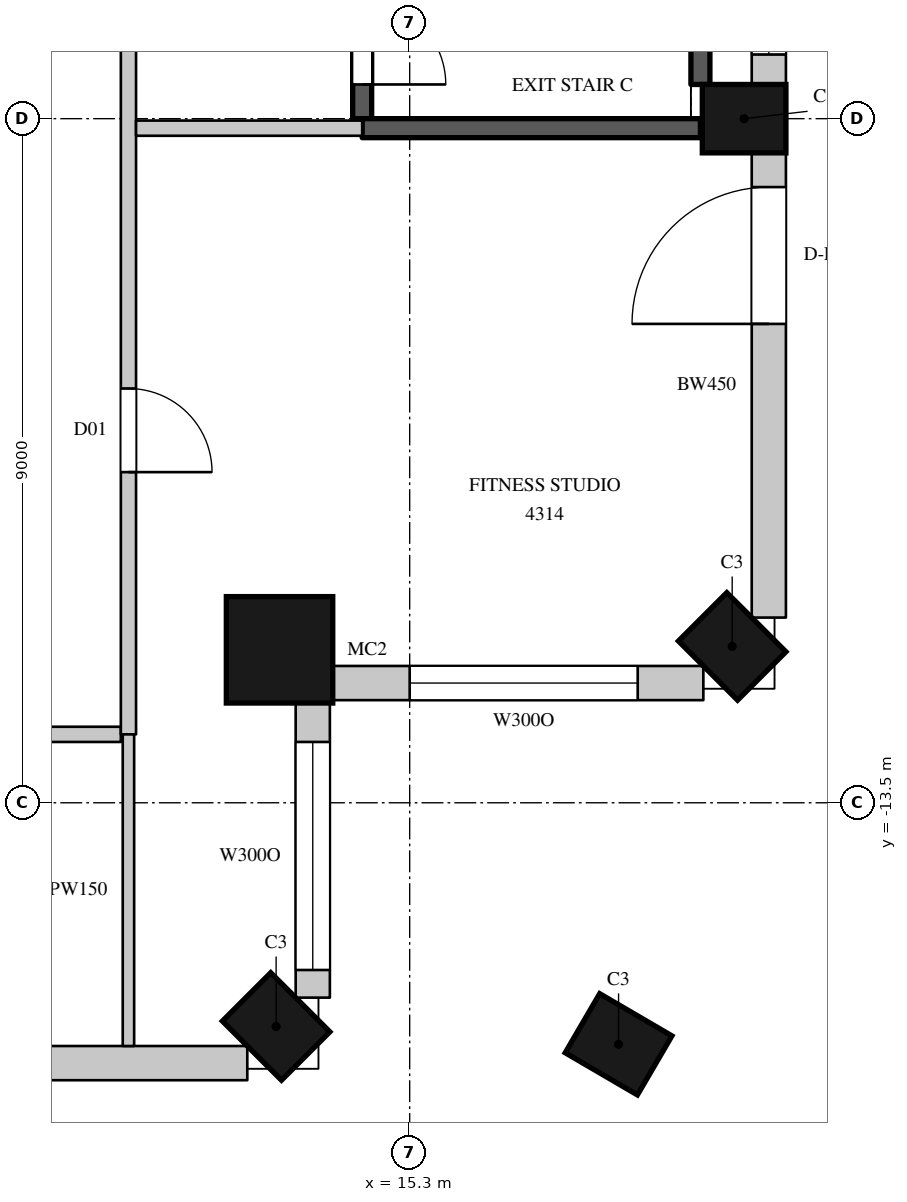
"""IFC4 building model, lengths in metres.
Left out: names, types, materials, properties, quantities, classifications, styles, units other than length and angle.
Written with IfcOpenShell. Run it as: python <this file> out.ifc"""

import sys

from ifc_helpers import new_model, si_unit, direction, frame, frame_2d, origin, origin_2d, place, context, subcontext, project, spatial, rectangle, circle, extrude, element, fill, save


model = new_model("IFC4")
c1 = context("Model", 3, precision=1e-05, world=origin(), true_north=direction((0.0, 1.0)))
c2 = subcontext(c1, "Body", "Model", "MODEL_VIEW")
j1 = project(units=[si_unit("LENGTHUNIT", "METRE"), si_unit("PLANEANGLEUNIT", "RADIAN")], contexts=[c1])
p1 = place(None, origin())
s1 = spatial("IfcSite", under=j1, at=p1, CompositionType="ELEMENT")
p2 = place(p1, origin())
s2 = spatial("IfcBuilding", under=s1, at=p2, CompositionType="ELEMENT")
p3 = place(p2, frame((0.0, 0.0, 197.4)))
s3 = spatial("IfcBuildingStorey", under=s2, at=p3, CompositionType="ELEMENT", Elevation=197.4)
p4 = place(p3, frame((13.543, -16.443, 0.0), z_axis=(0.0, 0.0, 1.0), x_axis=(0.707106781187, 0.707106781187, 0.0)))
e1 = element("IfcColumn", 1, at=p4, inside=s3, PredefinedType="COLUMN", context=c2, shape_type="SweptSolid", body=[
    extrude(rectangle(XDim=0.9, YDim=1.1, at=origin_2d()), origin(), (0.0, 0.0, 1.0), 4.1),
])
p5 = place(p3, frame((13.588, -11.488, 0.0), z_axis=(0.0, 0.0, 1.0), x_axis=(1.0, 0.0, 0.0)))
e2 = element("IfcColumn", 2, at=p5, inside=s3, PredefinedType="COLUMN", context=c2, shape_type="SweptSolid", body=[
    extrude(circle(Radius=0.7, at=origin_2d()), origin(), (0.0, 0.0, 1.0), 4.1),
])
for number, where, z_axis, x_axis in (
    (3, (19.543, -11.443, 0.0), (0.0, 0.0, 1.0), (0.707, 0.707, 0.0)),
    (4, (19.7, -4.5, 0.0), (0.0, 0.0, 1.0), (0.0, 1.0, 0.0)),
    (5, (18.048, -16.677, 0.0), (0.0, 0.0, 1.0), (0.504, 0.863, 0.0)),
):
    element("IfcColumn", number, at=place(p3, frame(where, z_axis=z_axis, x_axis=x_axis)), inside=s3, PredefinedType="COLUMN", context=c2, shape_type="SweptSolid", body=[
        extrude(rectangle(XDim=0.9, YDim=1.1, at=origin_2d()), origin(), (0.0, 0.0, 1.0), 4.1),
    ])
p6 = place(p3, frame((6.75, -16.925, 0.0), z_axis=(0.0, 0.0, 1.0), x_axis=(1.0, 0.0, 0.0)))
e6 = element("IfcWall", 6, at=p6, inside=s3, PredefinedType="SOLIDWALL", context=c2, shape_type="SweptSolid", body=[
    extrude(rectangle(XDim=6.414, YDim=0.45, at=frame_2d((3.207, 0.0))), origin(), (0.0, 0.0, 1.0), 3.8),
])
p7 = place(p6, frame((0.525, 0.0, 0.0)))
e7 = element("IfcOpeningElement", 7, at=p7, cuts=e6, PredefinedType="OPENING", context=c2, shape_type="SweptSolid", body=[
    extrude(rectangle(XDim=1.8, YDim=2.4, at=frame_2d((0.9, 1.2))), frame((0.0, 0.235, 0.0), z_axis=(0.0, -1.0, 0.0), x_axis=(1.0, 0.0, 0.0)), (0.0, 0.0, 1.0), 0.47),
])
p8 = place(p3, frame((14.025, -16.064, 0.0), z_axis=(0.0, 0.0, 1.0), x_axis=(0.0, 1.0, 0.0)))
e8 = element("IfcWall", 8, at=p8, inside=s3, PredefinedType="SOLIDWALL", context=c2, shape_type="SweptSolid", body=[
    extrude(rectangle(XDim=3.909, YDim=0.45, at=frame_2d((1.955, 0.0))), origin(), (0.0, 0.0, 1.0), 3.8),
])
p9 = place(p8, frame((0.364, 0.0, 1.05)))
e9 = element("IfcOpeningElement", 9, at=p9, cuts=e8, PredefinedType="OPENING", context=c2, shape_type="SweptSolid", body=[
    extrude(rectangle(XDim=3.0, YDim=2.4, at=frame_2d((1.5, 1.2))), frame((0.0, 0.235, 0.0), z_axis=(0.0, -1.0, 0.0), x_axis=(1.0, 0.0, 0.0)), (0.0, 0.0, 1.0), 0.47),
])
p10 = place(p3, frame((14.255, -11.925, 0.0), z_axis=(0.0, 0.0, 1.0), x_axis=(1.0, 0.0, 0.0)))
e10 = element("IfcWall", 10, at=p10, inside=s3, PredefinedType="SOLIDWALL", context=c2, shape_type="SweptSolid", body=[
    extrude(rectangle(XDim=4.909, YDim=0.45, at=frame_2d((2.455, 0.0))), origin(), (0.0, 0.0, 1.0), 3.8),
])
p11 = place(p10, frame((1.045, 0.0, 1.05)))
e11 = element("IfcOpeningElement", 11, at=p11, cuts=e10, PredefinedType="OPENING", context=c2, shape_type="SweptSolid", body=[
    extrude(rectangle(XDim=3.0, YDim=2.4, at=frame_2d((1.5, 1.2))), frame((0.0, 0.235, 0.0), z_axis=(0.0, -1.0, 0.0), x_axis=(1.0, 0.0, 0.0)), (0.0, 0.0, 1.0), 0.47),
])
p12 = place(p3, frame((20.025, -11.064, 0.0), z_axis=(0.0, 0.0, 1.0), x_axis=(0.0, 1.0, 0.0)))
e12 = element("IfcWall", 12, at=p12, inside=s3, PredefinedType="SOLIDWALL", context=c2, shape_type="SweptSolid", body=[
    extrude(rectangle(XDim=6.114, YDim=0.45, at=frame_2d((3.057, 0.0))), origin(), (0.0, 0.0, 1.0), 3.8),
])
p13 = place(p12, frame((3.864, 0.0, 0.0)))
e13 = element("IfcOpeningElement", 13, at=p13, cuts=e12, PredefinedType="OPENING", context=c2, shape_type="SweptSolid", body=[
    extrude(rectangle(XDim=1.8, YDim=2.4, at=frame_2d((0.9, 1.2))), frame((0.0, 0.235, 0.0), z_axis=(0.0, -1.0, 0.0), x_axis=(1.0, 0.0, 0.0)), (0.0, 0.0, 1.0), 0.47),
])
p14 = place(p3, frame((20.025, -4.05, 0.0), z_axis=(0.0, 0.0, 1.0), x_axis=(0.0, 1.0, 0.0)))
e14 = element("IfcWall", 14, at=p14, inside=s3, PredefinedType="SOLIDWALL", context=c2, shape_type="SweptSolid", body=[
    extrude(rectangle(XDim=8.439, YDim=0.45, at=frame_2d((4.219, 0.0))), origin(), (0.0, 0.0, 1.0), 3.8),
])
p15 = place(p14, frame((0.394, 0.0, 1.05)))
e15 = element("IfcOpeningElement", 15, at=p15, cuts=e14, PredefinedType="OPENING", context=c2, shape_type="SweptSolid", body=[
    extrude(rectangle(XDim=3.0, YDim=2.4, at=frame_2d((1.5, 1.2))), frame((0.0, 0.235, 0.0), z_axis=(0.0, -1.0, 0.0), x_axis=(1.0, 0.0, 0.0)), (0.0, 0.0, 1.0), 0.47),
])
p16 = place(p14, frame((5.082, 0.0, 1.05)))
e16 = element("IfcOpeningElement", 16, at=p16, cuts=e14, PredefinedType="OPENING", context=c2, shape_type="SweptSolid", body=[
    extrude(rectangle(XDim=3.0, YDim=2.4, at=frame_2d((1.5, 1.2))), frame((0.0, 0.235, 0.0), z_axis=(0.0, -1.0, 0.0), x_axis=(1.0, 0.0, 0.0)), (0.0, 0.0, 1.0), 0.47),
])
p17 = place(p3, frame((6.28, -12.6, 0.0), z_axis=(0.0, 0.0, 1.0), x_axis=(1.0, 0.0, 0.0)))
e17 = element("IfcWall", 17, at=p17, inside=s3, PredefinedType="PARTITIONING", context=c2, shape_type="SweptSolid", body=[
    extrude(rectangle(XDim=5.22, YDim=0.2, at=frame_2d((2.61, 0.0))), origin(), (0.0, 0.0, 1.0), 3.8),
])
p18 = place(p17, frame((0.8, 0.0, 0.0)))
e18 = element("IfcOpeningElement", 18, at=p18, cuts=e17, PredefinedType="OPENING", context=c2, shape_type="SweptSolid", body=[
    extrude(rectangle(XDim=1.1, YDim=2.4, at=frame_2d((0.55, 1.2))), frame((0.0, 0.11, 0.0), z_axis=(0.0, -1.0, 0.0), x_axis=(1.0, 0.0, 0.0)), (0.0, 0.0, 1.0), 0.22),
])
p19 = place(p3, frame((11.6, -12.6, 0.0), z_axis=(0.0, 0.0, 1.0), x_axis=(0.0, 1.0, 0.0)))
e19 = element("IfcWall", 19, at=p19, inside=s3, PredefinedType="PARTITIONING", context=c2, shape_type="SweptSolid", body=[
    extrude(rectangle(XDim=25.1, YDim=0.2, at=frame_2d((12.55, 0.0))), origin(), (0.0, 0.0, 1.0), 3.8),
])
p20 = place(p19, frame((10.45, 0.0, 0.0)))
e20 = element("IfcOpeningElement", 20, at=p20, cuts=e19, PredefinedType="OPENING", context=c2, shape_type="SweptSolid", body=[
    extrude(rectangle(XDim=1.5, YDim=2.4, at=frame_2d((0.75, 1.2))), frame((0.0, 0.11, 0.0), z_axis=(0.0, -1.0, 0.0), x_axis=(1.0, 0.0, 0.0)), (0.0, 0.0, 1.0), 0.22),
])
p21 = place(p19, frame((3.45, 0.0, 0.0)))
e21 = element("IfcOpeningElement", 21, at=p21, cuts=e19, PredefinedType="OPENING", context=c2, shape_type="SweptSolid", body=[
    extrude(rectangle(XDim=1.1, YDim=2.4, at=frame_2d((0.55, 1.2))), frame((0.0, 0.11, 0.0), z_axis=(0.0, -1.0, 0.0), x_axis=(1.0, 0.0, 0.0)), (0.0, 0.0, 1.0), 0.22),
])
p22 = place(p3, frame((11.7, -4.625, 0.0), z_axis=(0.0, 0.0, 1.0), x_axis=(1.0, 0.0, 0.0)))
e22 = element("IfcWall", 22, at=p22, inside=s3, PredefinedType="PARTITIONING", context=c2, shape_type="SweptSolid", body=[
    extrude(rectangle(XDim=2.975, YDim=0.2, at=frame_2d((1.488, 0.0))), origin(), (0.0, 0.0, 1.0), 3.8),
])
p23 = place(p3, frame((11.6, -16.7, 0.0), z_axis=(0.0, 0.0, 1.0), x_axis=(0.0, 1.0, 0.0)))
e23 = element("IfcWall", 23, at=p23, inside=s3, PredefinedType="PARTITIONING", context=c2, shape_type="SweptSolid", body=[
    extrude(rectangle(XDim=4.1, YDim=0.15, at=frame_2d((2.05, 0.0))), origin(), (0.0, 0.0, 1.0), 3.8),
])
p24 = place(p3, frame((14.675, -4.5, 0.0), z_axis=(0.0, 0.0, 1.0), x_axis=(0.0, 1.0, 0.0)))
e24 = element("IfcWall", 24, at=p24, inside=s3, PredefinedType="SHEAR", context=c2, shape_type="SweptSolid", body=[
    extrude(rectangle(XDim=9.0, YDim=0.25, at=frame_2d((4.5, 0.0))), origin(), (0.0, 0.0, 1.0), 3.8),
])
p25 = place(p24, frame((0.45, 0.0, 0.0)))
e25 = element("IfcOpeningElement", 25, at=p25, cuts=e24, PredefinedType="OPENING", context=c2, shape_type="SweptSolid", body=[
    extrude(rectangle(XDim=1.1, YDim=2.2, at=frame_2d((0.55, 1.1))), frame((0.0, 0.135, 0.0), z_axis=(0.0, -1.0, 0.0), x_axis=(1.0, 0.0, 0.0)), (0.0, 0.0, 1.0), 0.27),
])
p26 = place(p3, frame((14.675, -4.625, 0.0), z_axis=(0.0, 0.0, 1.0), x_axis=(1.0, 0.0, 0.0)))
e26 = element("IfcWall", 26, at=p26, inside=s3, PredefinedType="SHEAR", context=c2, shape_type="SweptSolid", body=[
    extrude(rectangle(XDim=4.45, YDim=0.25, at=frame_2d((2.225, 0.0))), origin(), (0.0, 0.0, 1.0), 3.8),
])
p27 = place(p3, frame((19.125, -4.05, 0.0), z_axis=(0.0, 0.0, 1.0), x_axis=(0.0, 1.0, 0.0)))
e27 = element("IfcWall", 27, at=p27, inside=s3, PredefinedType="SHEAR", context=c2, shape_type="SweptSolid", body=[
    extrude(rectangle(XDim=8.477, YDim=0.25, at=frame_2d((4.238, 0.0))), origin(), (0.0, 0.0, 1.0), 3.8),
])
p28 = place(p9, origin())
e28 = element("IfcWindow", 28, at=p28, inside=s3, PartitioningType="SINGLE_PANEL", PredefinedType="WINDOW", context=c2, shape_type="SweptSolid", body=[
    extrude(rectangle(XDim=3.0, YDim=2.4, at=frame_2d((1.5, 1.2))), frame((0.0, 0.135, 0.0), z_axis=(0.0, -1.0, 0.0), x_axis=(1.0, 0.0, 0.0)), (0.0, 0.0, 1.0), 0.06),
])
fill(e9, e28)
p29 = place(p11, origin())
e29 = element("IfcWindow", 29, at=p29, inside=s3, PartitioningType="SINGLE_PANEL", PredefinedType="WINDOW", context=c2, shape_type="SweptSolid", body=[
    extrude(rectangle(XDim=3.0, YDim=2.4, at=frame_2d((1.5, 1.2))), frame((0.0, 0.135, 0.0), z_axis=(0.0, -1.0, 0.0), x_axis=(1.0, 0.0, 0.0)), (0.0, 0.0, 1.0), 0.06),
])
fill(e11, e29)
p30 = place(p13, origin())
e30 = element("IfcDoor", 30, at=p30, inside=s3, OperationType="SLIDING_TO_LEFT", PredefinedType="DOOR", context=c2, shape_type="SweptSolid", body=[
    extrude(rectangle(XDim=1.8, YDim=2.4, at=frame_2d((0.9, 1.2))), frame((0.0, 0.13, 0.0), z_axis=(0.0, -1.0, 0.0), x_axis=(1.0, 0.0, 0.0)), (0.0, 0.0, 1.0), 0.05),
])
fill(e13, e30)
p31 = place(p15, origin())
e31 = element("IfcWindow", 31, at=p31, inside=s3, PartitioningType="SINGLE_PANEL", PredefinedType="WINDOW", context=c2, shape_type="SweptSolid", body=[
    extrude(rectangle(XDim=3.0, YDim=2.4, at=frame_2d((1.5, 1.2))), frame((0.0, 0.135, 0.0), z_axis=(0.0, -1.0, 0.0), x_axis=(1.0, 0.0, 0.0)), (0.0, 0.0, 1.0), 0.06),
])
fill(e15, e31)
p32 = place(p21, origin())
e32 = element("IfcDoor", 32, at=p32, inside=s3, OperationType="SINGLE_SWING_RIGHT", PredefinedType="DOOR", context=c2, shape_type="SweptSolid", body=[
    extrude(rectangle(XDim=1.1, YDim=2.4, at=frame_2d((0.55, 1.2))), frame((0.0, 0.025, 0.0), z_axis=(0.0, -1.0, 0.0), x_axis=(1.0, 0.0, 0.0)), (0.0, 0.0, 1.0), 0.05),
])
fill(e21, e32)
p33 = place(p25, origin())
e33 = element("IfcDoor", 33, at=p33, inside=s3, OperationType="SINGLE_SWING_RIGHT", PredefinedType="DOOR", context=c2, shape_type="SweptSolid", body=[
    extrude(rectangle(XDim=1.1, YDim=2.2, at=frame_2d((0.55, 1.1))), frame((0.0, 0.025, 0.0), z_axis=(0.0, -1.0, 0.0), x_axis=(1.0, 0.0, 0.0)), (0.0, 0.0, 1.0), 0.05),
])
fill(e25, e33)
save(model, sys.argv[1])
